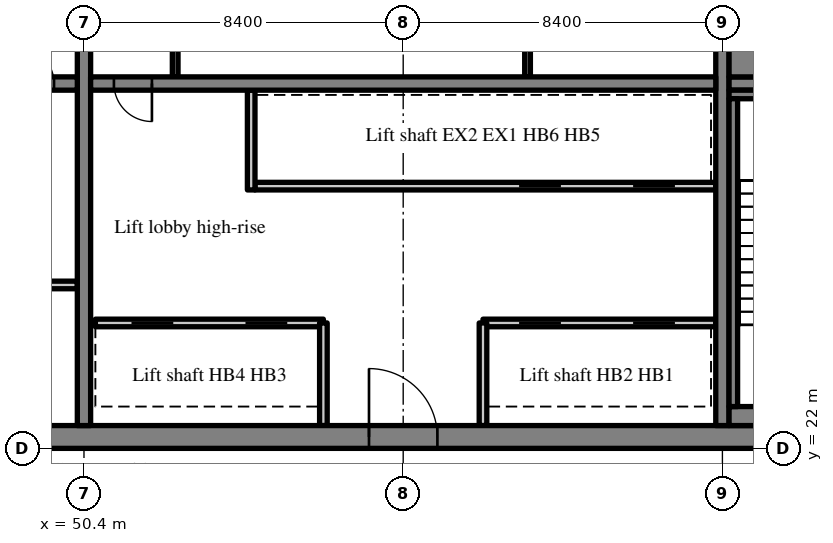
"""IFC4 building model, lengths in metres.
Left out: names, types, materials, properties, quantities, classifications, styles, units other than length and angle.
Written with IfcOpenShell. Run it as: python <this file> out.ifc"""

import sys

from ifc_helpers import new_model, si_unit, direction, frame, frame_2d, origin, place, context, subcontext, project, spatial, rectangle, extrude, source, transform, mapped, element, fill, save


model = new_model("IFC4")
c1 = context("Model", 3, precision=1e-05, world=origin(), true_north=direction((0.0, 1.0)))
c2 = subcontext(c1, "Body", "Model", "MODEL_VIEW")
j1 = project(units=[si_unit("LENGTHUNIT", "METRE"), si_unit("PLANEANGLEUNIT", "RADIAN")], contexts=[c1])
p1 = place(None, origin())
s1 = spatial("IfcSite", under=j1, at=p1, CompositionType="ELEMENT")
p2 = place(p1, origin())
s2 = spatial("IfcBuilding", under=s1, at=p2, CompositionType="ELEMENT")
p3 = place(p2, frame((0.0, 0.0, 241.3)))
s3 = spatial("IfcBuildingStorey", under=s2, at=p3, CompositionType="ELEMENT", Elevation=241.3)
m1 = source(origin(), c2, "Body", "SweptSolid", [
    extrude(rectangle(XDim=50.4, YDim=0.6, at=frame_2d((25.2, 0.0))), origin(), (0.0, 0.0, 1.0), 3.62),
])
p4 = place(p3, frame((25.2, 22.3, 0.0), z_axis=(0.0, 0.0, 1.0), x_axis=(1.0, 0.0, 0.0)))
e1 = element("IfcWall", 1, at=p4, inside=s3, PredefinedType="SHEAR", context=c2, shape_type="MappedRepresentation", body=[
    mapped(m1, transform((0.0, 0.0, 0.0), scale=1.0)),
])
m2 = source(origin(), c2, "Body", "SweptSolid", [
    extrude(rectangle(XDim=1.8, YDim=2.1, at=frame_2d((0.9, 1.05))), frame((0.0, 0.31, 0.0), z_axis=(0.0, -1.0, 0.0), x_axis=(1.0, 0.0, 0.0)), (0.0, 0.0, 1.0), 0.62),
])
p5 = place(p4, frame((15.9, 0.0, 0.0)))
e2 = element("IfcOpeningElement", 2, at=p5, cuts=e1, PredefinedType="OPENING", context=c2, shape_type="MappedRepresentation", body=[
    mapped(m2, transform((0.0, 0.0, 0.0), scale=1.0)),
])
m3 = source(origin(), c2, "Body", "SweptSolid", [
    extrude(rectangle(XDim=0.9, YDim=2.1, at=frame_2d((0.45, 1.05))), frame((0.0, 0.31, 0.0), z_axis=(0.0, -1.0, 0.0), x_axis=(1.0, 0.0, 0.0)), (0.0, 0.0, 1.0), 0.62),
])
p6 = place(p4, frame((9.687, 0.0, 0.0)))
e3 = element("IfcOpeningElement", 3, at=p6, cuts=e1, PredefinedType="OPENING", context=c2, shape_type="MappedRepresentation", body=[
    mapped(m3, transform((0.0, 0.0, 0.0), scale=1.0)),
])
p7 = place(p4, frame((21.513, 0.0, 0.0)))
e4 = element("IfcOpeningElement", 4, at=p7, cuts=e1, PredefinedType="OPENING", context=c2, shape_type="MappedRepresentation", body=[
    mapped(m3, transform((0.0, 0.0, 0.0), scale=1.0)),
])
p8 = place(p4, frame((32.7, 0.0, 0.0)))
e5 = element("IfcOpeningElement", 5, at=p8, cuts=e1, PredefinedType="OPENING", context=c2, shape_type="MappedRepresentation", body=[
    mapped(m2, transform((0.0, 0.0, 0.0), scale=1.0)),
])
m4 = source(origin(), c2, "Body", "SweptSolid", [
    extrude(rectangle(XDim=1.2, YDim=2.1, at=frame_2d((0.6, 1.05))), frame((0.0, 0.31, 0.0), z_axis=(0.0, -1.0, 0.0), x_axis=(1.0, 0.0, 0.0)), (0.0, 0.0, 1.0), 0.62),
])
p9 = place(p4, frame((6.488, 0.0, 0.0)))
e6 = element("IfcOpeningElement", 6, at=p9, cuts=e1, PredefinedType="OPENING", context=c2, shape_type="MappedRepresentation", body=[
    mapped(m4, transform((0.0, 0.0, 0.0), scale=1.0)),
])
p10 = place(p4, frame((47.925, 0.0, 0.0)))
e7 = element("IfcOpeningElement", 7, at=p10, cuts=e1, PredefinedType="OPENING", context=c2, shape_type="MappedRepresentation", body=[
    mapped(m4, transform((0.0, 0.0, 0.0), scale=1.0)),
])
m5 = source(origin(), c2, "Body", "SweptSolid", [
    extrude(rectangle(XDim=18.8, YDim=0.35, at=frame_2d((9.4, 0.0))), origin(), (0.0, 0.0, 1.0), 3.62),
])
p11 = place(p3, frame((50.4, 22.6, 0.0), z_axis=(0.0, 0.0, 1.0), x_axis=(0.0, 1.0, 0.0)))
e8 = element("IfcWall", 8, at=p11, inside=s3, PredefinedType="SHEAR", context=c2, shape_type="MappedRepresentation", body=[
    mapped(m5, transform((0.0, 0.0, 0.0), scale=1.0)),
])
m6 = source(origin(), c2, "Body", "SweptSolid", [
    extrude(rectangle(XDim=1.1, YDim=2.1, at=frame_2d((0.55, 1.05))), frame((0.0, 0.185, 0.0), z_axis=(0.0, -1.0, 0.0), x_axis=(1.0, 0.0, 0.0)), (0.0, 0.0, 1.0), 0.37),
])
p12 = place(p11, frame((12.85, 0.0, 0.0)))
e9 = element("IfcOpeningElement", 9, at=p12, cuts=e8, PredefinedType="OPENING", context=c2, shape_type="MappedRepresentation", body=[
    mapped(m6, transform((0.0, 0.0, 0.0), scale=1.0)),
])
p13 = place(p3, frame((67.2, 22.6, 0.0), z_axis=(0.0, 0.0, 1.0), x_axis=(0.0, 1.0, 0.0)))
e10 = element("IfcWall", 10, at=p13, inside=s3, PredefinedType="SHEAR", context=c2, shape_type="MappedRepresentation", body=[
    mapped(m5, transform((0.0, 0.0, 0.0), scale=1.0)),
])
m7 = source(origin(), c2, "Body", "SweptSolid", [
    extrude(rectangle(XDim=16.45, YDim=0.35, at=frame_2d((8.225, 0.0))), origin(), (0.0, 0.0, 1.0), 3.62),
])
p14 = place(p3, frame((33.775, 31.6, 0.0), z_axis=(0.0, 0.0, 1.0), x_axis=(1.0, 0.0, 0.0)))
e11 = element("IfcWall", 11, at=p14, inside=s3, PredefinedType="SHEAR", context=c2, shape_type="MappedRepresentation", body=[
    mapped(m7, transform((0.0, 0.0, 0.0), scale=1.0)),
])
m8 = source(origin(), c2, "Body", "SweptSolid", [
    extrude(rectangle(XDim=1.0, YDim=2.1, at=frame_2d((0.5, 1.05))), frame((0.0, 0.185, 0.0), z_axis=(0.0, -1.0, 0.0), x_axis=(1.0, 0.0, 0.0)), (0.0, 0.0, 1.0), 0.37),
])
p15 = place(p14, frame((14.837, 0.0, 0.0)))
e12 = element("IfcOpeningElement", 12, at=p15, cuts=e11, PredefinedType="OPENING", context=c2, shape_type="MappedRepresentation", body=[
    mapped(m8, transform((0.0, 0.0, 0.0), scale=1.0)),
])
m9 = source(origin(), c2, "Body", "SweptSolid", [
    extrude(rectangle(XDim=16.45, YDim=0.35, at=frame_2d((8.225, 0.0))), origin(), (0.0, 0.0, 1.0), 3.62),
])
p16 = place(p3, frame((50.575, 31.6, 0.0), z_axis=(0.0, 0.0, 1.0), x_axis=(1.0, 0.0, 0.0)))
e13 = element("IfcWall", 13, at=p16, inside=s3, PredefinedType="SHEAR", context=c2, shape_type="MappedRepresentation", body=[
    mapped(m9, transform((0.0, 0.0, 0.0), scale=1.0)),
])
p17 = place(p16, frame((0.613, 0.0, 0.0)))
e14 = element("IfcOpeningElement", 14, at=p17, cuts=e13, PredefinedType="OPENING", context=c2, shape_type="MappedRepresentation", body=[
    mapped(m8, transform((0.0, 0.0, 0.0), scale=1.0)),
])
m10 = source(origin(), c2, "Body", "SweptSolid", [
    extrude(rectangle(XDim=7.625, YDim=0.35, at=frame_2d((3.812, 0.0))), origin(), (0.0, 0.0, 1.0), 3.62),
])
p18 = place(p3, frame((67.375, 31.6, 0.0), z_axis=(0.0, 0.0, 1.0), x_axis=(1.0, 0.0, 0.0)))
e15 = element("IfcWall", 15, at=p18, inside=s3, PredefinedType="SHEAR", context=c2, shape_type="MappedRepresentation", body=[
    mapped(m10, transform((0.0, 0.0, 0.0), scale=1.0)),
])
p19 = place(p18, frame((5.8, 0.0, 0.0)))
e16 = element("IfcOpeningElement", 16, at=p19, cuts=e15, PredefinedType="OPENING", context=c2, shape_type="MappedRepresentation", body=[
    mapped(m6, transform((0.0, 0.0, 0.0), scale=1.0)),
])
m11 = source(origin(), c2, "Body", "SweptSolid", [
    extrude(rectangle(XDim=6.125, YDim=0.2, at=frame_2d((3.062, 0.0))), origin(), (0.0, 0.0, 1.0), 3.62),
])
p20 = place(p3, frame((44.1, 26.3, 0.0), z_axis=(0.0, 0.0, 1.0), x_axis=(1.0, 0.0, 0.0)))
e17 = element("IfcWall", 17, at=p20, inside=s3, PredefinedType="PARTITIONING", context=c2, shape_type="MappedRepresentation", body=[
    mapped(m11, transform((0.0, 0.0, 0.0), scale=1.0)),
])
p21 = place(p3, frame((67.025, 25.3, 0.0), z_axis=(0.0, 0.0, 1.0), x_axis=(-1.0, 0.0, 0.0)))
e18 = element("IfcWall", 18, at=p21, inside=s3, PredefinedType="SOLIDWALL", context=c2, shape_type="MappedRepresentation", body=[
    mapped(m11, transform((0.0, 0.0, 0.0), scale=1.0)),
])
m12 = source(origin(), c2, "Body", "SweptSolid", [
    extrude(rectangle(XDim=1.1, YDim=2.1, at=frame_2d((0.55, 1.05))), frame((0.0, 0.11, 0.0), z_axis=(0.0, -1.0, 0.0), x_axis=(1.0, 0.0, 0.0)), (0.0, 0.0, 1.0), 0.22),
])
p22 = place(p21, frame((1.075, 0.0, 0.0)))
e19 = element("IfcOpeningElement", 19, at=p22, cuts=e18, PredefinedType="OPENING", context=c2, shape_type="MappedRepresentation", body=[
    mapped(m12, transform((0.0, 0.0, 0.0), scale=1.0)),
])
p23 = place(p21, frame((4.075, 0.0, 0.0)))
e20 = element("IfcOpeningElement", 20, at=p23, cuts=e18, PredefinedType="OPENING", context=c2, shape_type="MappedRepresentation", body=[
    mapped(m12, transform((0.0, 0.0, 0.0), scale=1.0)),
])
m13 = source(origin(), c2, "Body", "SweptSolid", [
    extrude(rectangle(XDim=6.0, YDim=0.2, at=frame_2d((3.0, 0.0))), origin(), (0.0, 0.0, 1.0), 3.62),
])
p24 = place(p3, frame((56.7, 25.3, 0.0), z_axis=(0.0, 0.0, 1.0), x_axis=(-1.0, 0.0, 0.0)))
e21 = element("IfcWall", 21, at=p24, inside=s3, PredefinedType="SOLIDWALL", context=c2, shape_type="MappedRepresentation", body=[
    mapped(m13, transform((0.0, 0.0, 0.0), scale=1.0)),
])
p25 = place(p24, frame((0.95, 0.0, 0.0)))
e22 = element("IfcOpeningElement", 22, at=p25, cuts=e21, PredefinedType="OPENING", context=c2, shape_type="MappedRepresentation", body=[
    mapped(m12, transform((0.0, 0.0, 0.0), scale=1.0)),
])
p26 = place(p24, frame((3.95, 0.0, 0.0)))
e23 = element("IfcOpeningElement", 23, at=p26, cuts=e21, PredefinedType="OPENING", context=c2, shape_type="MappedRepresentation", body=[
    mapped(m12, transform((0.0, 0.0, 0.0), scale=1.0)),
])
m14 = source(origin(), c2, "Body", "SweptSolid", [
    extrude(rectangle(XDim=12.125, YDim=0.2, at=frame_2d((6.062, 0.0))), origin(), (0.0, 0.0, 1.0), 3.62),
])
p27 = place(p3, frame((67.025, 28.9, 0.0), z_axis=(0.0, 0.0, 1.0), x_axis=(-1.0, 0.0, 0.0)))
e24 = element("IfcWall", 24, at=p27, inside=s3, PredefinedType="SOLIDWALL", context=c2, shape_type="MappedRepresentation", body=[
    mapped(m14, transform((0.0, 0.0, 0.0), scale=1.0)),
])
p28 = place(p27, frame((1.075, 0.0, 0.0)))
e25 = element("IfcOpeningElement", 25, at=p28, cuts=e24, PredefinedType="OPENING", context=c2, shape_type="MappedRepresentation", body=[
    mapped(m12, transform((0.0, 0.0, 0.0), scale=1.0)),
])
p29 = place(p27, frame((4.075, 0.0, 0.0)))
e26 = element("IfcOpeningElement", 26, at=p29, cuts=e24, PredefinedType="OPENING", context=c2, shape_type="MappedRepresentation", body=[
    mapped(m12, transform((0.0, 0.0, 0.0), scale=1.0)),
])
m15 = source(origin(), c2, "Body", "SweptSolid", [
    extrude(rectangle(XDim=2.7, YDim=0.2, at=frame_2d((1.35, 0.0))), origin(), (0.0, 0.0, 1.0), 3.62),
])
for number, where, z_axis, x_axis in (
    (27, (60.9, 22.6, 0.0), (0.0, 0.0, 1.0), (0.0, 1.0, 0.0)),
    (28, (56.7, 22.6, 0.0), (0.0, 0.0, 1.0), (0.0, 1.0, 0.0)),
):
    element("IfcWall", number, at=place(p3, frame(where, z_axis=z_axis, x_axis=x_axis)), inside=s3, PredefinedType="SOLIDWALL", context=c2, shape_type="MappedRepresentation", body=[
        mapped(m15, transform((0.0, 0.0, 0.0), scale=1.0)),
    ])
m16 = source(origin(), c2, "Body", "SweptSolid", [
    extrude(rectangle(XDim=2.625, YDim=0.2, at=frame_2d((1.312, 0.0))), origin(), (0.0, 0.0, 1.0), 3.62),
])
p30 = place(p3, frame((54.8, 28.8, 0.0), z_axis=(0.0, 0.0, 1.0), x_axis=(0.0, 1.0, 0.0)))
e29 = element("IfcWall", 29, at=p30, inside=s3, PredefinedType="SOLIDWALL", context=c2, shape_type="MappedRepresentation", body=[
    mapped(m16, transform((0.0, 0.0, 0.0), scale=1.0)),
])
m17 = source(origin(), c2, "Body", "SweptSolid", [
    extrude(rectangle(XDim=3.225, YDim=0.15, at=frame_2d((1.613, 0.0))), origin(), (0.0, 0.0, 1.0), 3.62),
])
for number, where, z_axis, x_axis in (
    (30, (52.8, 31.775, 0.0), (0.0, 0.0, 1.0), (0.0, 1.0, 0.0)),
    (31, (62.072, 31.775, 0.0), (0.0, 0.0, 1.0), (0.0, 1.0, 0.0)),
):
    element("IfcWall", number, at=place(p3, frame(where, z_axis=z_axis, x_axis=x_axis)), inside=s3, PredefinedType="PARTITIONING", context=c2, shape_type="MappedRepresentation", body=[
        mapped(m17, transform((0.0, 0.0, 0.0), scale=1.0)),
    ])
m18 = source(origin(), c2, "Body", "SweptSolid", [
    extrude(rectangle(XDim=4.875, YDim=0.5, at=frame_2d((2.438, 0.0))), origin(), (0.0, 0.0, 1.0), 3.62),
])
p31 = place(p3, frame((67.375, 22.85, 0.0), z_axis=(0.0, 0.0, 1.0), x_axis=(1.0, 0.0, 0.0)))
e32 = element("IfcWall", 32, at=p31, inside=s3, PredefinedType="SOLIDWALL", context=c2, shape_type="MappedRepresentation", body=[
    mapped(m18, transform((0.0, 0.0, 0.0), scale=1.0)),
])
m19 = source(origin(), c2, "Body", "SweptSolid", [
    extrude(rectangle(XDim=4.875, YDim=0.225, at=frame_2d((2.438, 0.0))), origin(), (0.0, 0.0, 1.0), 3.62),
])
p32 = place(p3, frame((67.375, 31.312, 0.0), z_axis=(0.0, 0.0, 1.0), x_axis=(1.0, 0.0, 0.0)))
e33 = element("IfcWall", 33, at=p32, inside=s3, PredefinedType="SOLIDWALL", context=c2, shape_type="MappedRepresentation", body=[
    mapped(m19, transform((0.0, 0.0, 0.0), scale=1.0)),
])
m20 = source(origin(), c2, "Body", "SweptSolid", [
    extrude(rectangle(XDim=8.1, YDim=0.225, at=frame_2d((4.05, 0.0))), origin(), (0.0, 0.0, 1.0), 3.62),
])
p33 = place(p3, frame((67.487, 23.1, 0.0), z_axis=(0.0, 0.0, 1.0), x_axis=(0.0, 1.0, 0.0)))
e34 = element("IfcWall", 34, at=p33, inside=s3, PredefinedType="SOLIDWALL", context=c2, shape_type="MappedRepresentation", body=[
    mapped(m20, transform((0.0, 0.0, 0.0), scale=1.0)),
])
m21 = source(origin(), c2, "Body", "SweptSolid", [
    extrude(rectangle(XDim=4.875, YDim=1.025, at=frame_2d((2.438, 0.0))), origin(), (0.0, 0.0, 1.0), 3.62),
])
p34 = place(p3, frame((67.375, 32.287, 0.0), z_axis=(0.0, 0.0, 1.0), x_axis=(1.0, 0.0, 0.0)))
e35 = element("IfcWall", 35, at=p34, inside=s3, PredefinedType="SOLIDWALL", context=c2, shape_type="MappedRepresentation", body=[
    mapped(m21, transform((0.0, 0.0, 0.0), scale=1.0)),
])
m22 = source(origin(), c2, "Body", "SweptSolid", [
    extrude(rectangle(XDim=1.0, YDim=2.1, at=frame_2d((0.5, 1.05))), frame((0.0, 0.025, 0.0), z_axis=(0.0, -1.0, 0.0), x_axis=(1.0, 0.0, 0.0)), (0.0, 0.0, 1.0), 0.05),
])
p35 = place(p15, origin())
e36 = element("IfcDoor", 36, at=p35, inside=s3, OperationType="SINGLE_SWING_LEFT", PredefinedType="DOOR", context=c2, shape_type="MappedRepresentation", body=[
    mapped(m22, transform((0.0, 0.0, 0.0), scale=1.0)),
])
fill(e12, e36)
m23 = source(origin(), c2, "Body", "SweptSolid", [
    extrude(rectangle(XDim=1.8, YDim=2.1, at=frame_2d((0.9, 1.05))), frame((0.0, 0.225, 0.0), z_axis=(0.0, -1.0, 0.0), x_axis=(1.0, 0.0, 0.0)), (0.0, 0.0, 1.0), 0.05),
])
p36 = place(p8, origin())
e37 = element("IfcDoor", 37, at=p36, inside=s3, OperationType="DOUBLE_DOOR_SINGLE_SWING", PredefinedType="DOOR", context=c2, shape_type="MappedRepresentation", body=[
    mapped(m23, transform((0.0, 0.0, 0.0), scale=1.0)),
])
fill(e5, e37)
p37 = place(p17, origin())
e38 = element("IfcDoor", 38, at=p37, inside=s3, OperationType="SINGLE_SWING_RIGHT", PredefinedType="DOOR", context=c2, shape_type="MappedRepresentation", body=[
    mapped(m22, transform((0.0, 0.0, 0.0), scale=1.0)),
])
fill(e14, e38)
m24 = source(origin(), c2, "Body", "SweptSolid", [
    extrude(rectangle(XDim=1.1, YDim=2.1, at=frame_2d((0.55, 1.05))), frame((0.0, 0.025, 0.0), z_axis=(0.0, -1.0, 0.0), x_axis=(1.0, 0.0, 0.0)), (0.0, 0.0, 1.0), 0.05),
])
p38 = place(p22, origin())
e39 = element("IfcDoor", 39, at=p38, inside=s3, OperationType="SLIDING_TO_RIGHT", PredefinedType="DOOR", context=c2, shape_type="MappedRepresentation", body=[
    mapped(m24, transform((0.0, 0.0, 0.0), scale=1.0)),
])
fill(e19, e39)
p39 = place(p23, origin())
e40 = element("IfcDoor", 40, at=p39, inside=s3, OperationType="SLIDING_TO_LEFT", PredefinedType="DOOR", context=c2, shape_type="MappedRepresentation", body=[
    mapped(m24, transform((0.0, 0.0, 0.0), scale=1.0)),
])
fill(e20, e40)
p40 = place(p25, origin())
e41 = element("IfcDoor", 41, at=p40, inside=s3, OperationType="SLIDING_TO_RIGHT", PredefinedType="DOOR", context=c2, shape_type="MappedRepresentation", body=[
    mapped(m24, transform((0.0, 0.0, 0.0), scale=1.0)),
])
fill(e22, e41)
p41 = place(p26, origin())
e42 = element("IfcDoor", 42, at=p41, inside=s3, OperationType="SLIDING_TO_LEFT", PredefinedType="DOOR", context=c2, shape_type="MappedRepresentation", body=[
    mapped(m24, transform((0.0, 0.0, 0.0), scale=1.0)),
])
fill(e23, e42)
p42 = place(p28, origin())
e43 = element("IfcDoor", 43, at=p42, inside=s3, OperationType="SLIDING_TO_RIGHT", PredefinedType="DOOR", context=c2, shape_type="MappedRepresentation", body=[
    mapped(m24, transform((0.0, 0.0, 0.0), scale=1.0)),
])
fill(e25, e43)
p43 = place(p29, origin())
e44 = element("IfcDoor", 44, at=p43, inside=s3, OperationType="SLIDING_TO_LEFT", PredefinedType="DOOR", context=c2, shape_type="MappedRepresentation", body=[
    mapped(m24, transform((0.0, 0.0, 0.0), scale=1.0)),
])
fill(e26, e44)
save(model, sys.argv[1])
